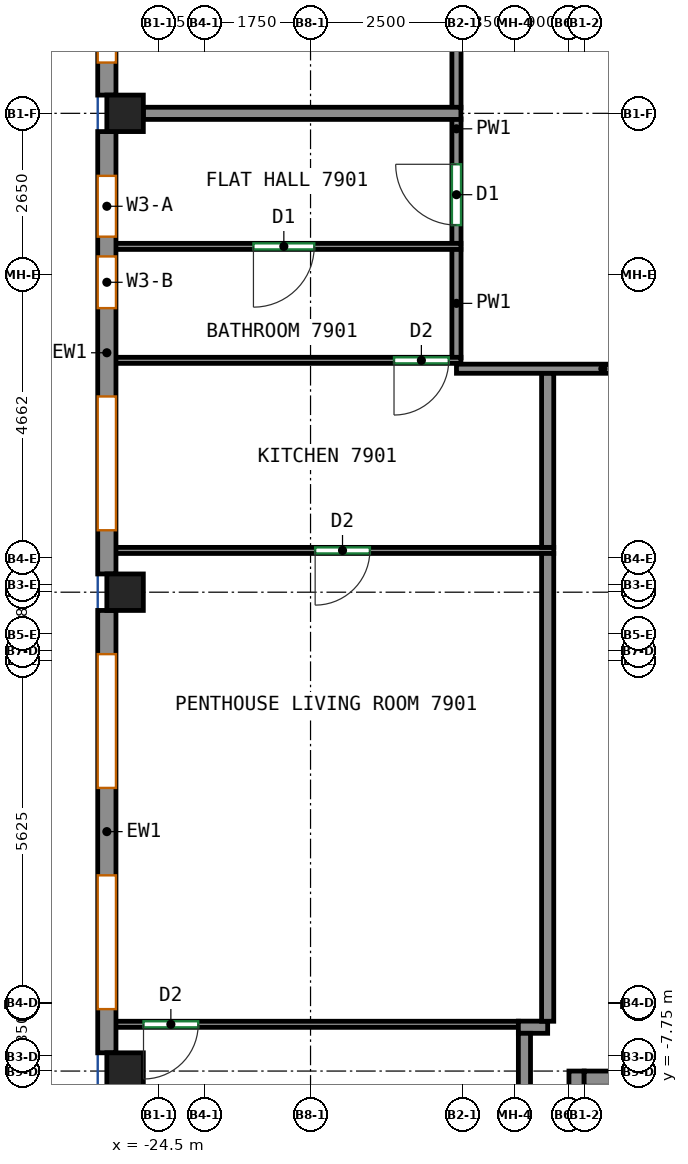
"""IFC4 building model, lengths in metres.
Left out: names, types, materials, properties, quantities, classifications, styles, units other than length and angle.
Written with IfcOpenShell. Run it as: python <this file> out.ifc"""

import sys

from ifc_helpers import new_model, si_unit, direction, frame, frame_2d, origin, origin_2d, place, context, subcontext, project, spatial, rectangle, extrude, source, transform, mapped, element, fill, save


model = new_model("IFC4")
c1 = context("Model", 3, precision=1e-05, world=origin(), true_north=direction((0.0, 1.0)))
c2 = subcontext(c1, "Body", "Model", "MODEL_VIEW")
j1 = project(units=[si_unit("LENGTHUNIT", "METRE"), si_unit("PLANEANGLEUNIT", "RADIAN")], contexts=[c1])
p1 = place(None, origin())
s1 = spatial("IfcSite", under=j1, at=p1, CompositionType="ELEMENT")
p2 = place(p1, origin())
s2 = spatial("IfcBuilding", under=s1, at=p2, CompositionType="ELEMENT")
p3 = place(p2, frame((0.0, 0.0, 315.4)))
s3 = spatial("IfcBuildingStorey", under=s2, at=p3, CompositionType="ELEMENT", Elevation=315.4)
m1 = source(origin(), c2, "Body", "SweptSolid", [
    extrude(rectangle(XDim=0.6, YDim=0.6, at=origin_2d()), origin(), (0.0, 0.0, 1.0), 3.0),
])
for number, where, z_axis, x_axis in (
    (1, (-25.05, -7.75, 0.0), (0.0, 0.0, 1.0), (1.0, 0.0, 0.0)),
    (2, (-25.05, 0.125, 0.0), (0.0, 0.0, 1.0), (1.0, 0.0, 0.0)),
    (3, (-25.05, 8.0, 0.0), (0.0, 0.0, 1.0), (1.0, 0.0, 0.0)),
):
    element("IfcColumn", number, at=place(p3, frame(where, z_axis=z_axis, x_axis=x_axis)), inside=s3, PredefinedType="COLUMN", context=c2, shape_type="MappedRepresentation", body=[
        mapped(m1, transform((0.0, 0.0, 0.0))),
    ])
m2 = source(origin(), c2, "Body", "SweptSolid", [
    extrude(rectangle(XDim=8.0, YDim=0.25, at=frame_2d((4.0, 0.0))), origin(), (0.0, 0.0, 1.0), 3.0),
])
p4 = place(p3, frame((-17.625, -15.75, 0.0), z_axis=(0.0, 0.0, 1.0), x_axis=(0.0, 1.0, 0.0)))
e4 = element("IfcWall", 4, at=p4, inside=s3, PredefinedType="SHEAR", context=c2, shape_type="MappedRepresentation", body=[
    mapped(m2, transform((0.0, 0.0, 0.0))),
])
m3 = source(origin(), c2, "Body", "SweptSolid", [
    extrude(rectangle(XDim=3.7, YDim=0.25, at=frame_2d((1.85, 0.0))), origin(), (0.0, 0.0, 1.0), 3.0),
])
p5 = place(p3, frame((-17.5, -7.875, 0.0), z_axis=(0.0, 0.0, 1.0), x_axis=(1.0, 0.0, 0.0)))
e5 = element("IfcWall", 5, at=p5, inside=s3, PredefinedType="SHEAR", context=c2, shape_type="MappedRepresentation", body=[
    mapped(m3, transform((0.0, 0.0, 0.0))),
])
m4 = source(origin(), c2, "Body", "SweptSolid", [
    extrude(rectangle(XDim=13.082, YDim=0.3, at=frame_2d((6.541, 0.0))), origin(), (0.0, 0.0, 1.0), 3.0),
])
p6 = place(p3, frame((-25.35, 21.382, 0.0), z_axis=(0.0, 0.0, 1.0), x_axis=(0.0, -1.0, 0.0)))
e6 = element("IfcWall", 6, at=p6, inside=s3, PredefinedType="SOLIDWALL", context=c2, shape_type="MappedRepresentation", body=[
    mapped(m4, transform((0.0, 0.0, 0.0))),
])
p7 = place(p6, frame((0.535, 0.0, 0.8)))
e7 = element("IfcOpeningElement", 7, at=p7, cuts=e6, PredefinedType="OPENING", context=c2, shape_type="SweptSolid", body=[
    extrude(rectangle(XDim=2.2, YDim=2.05, at=frame_2d((1.1, 1.025))), frame((0.0, 0.16, 0.0), z_axis=(0.0, -1.0, 0.0), x_axis=(1.0, 0.0, 0.0)), (0.0, 0.0, 1.0), 0.32),
])
p8 = place(p6, frame((3.806, 0.0, 0.8)))
e8 = element("IfcOpeningElement", 8, at=p8, cuts=e6, PredefinedType="OPENING", context=c2, shape_type="SweptSolid", body=[
    extrude(rectangle(XDim=2.2, YDim=2.05, at=frame_2d((1.1, 1.025))), frame((0.0, 0.16, 0.0), z_axis=(0.0, -1.0, 0.0), x_axis=(1.0, 0.0, 0.0)), (0.0, 0.0, 1.0), 0.32),
])
p9 = place(p6, frame((7.076, 0.0, 0.8)))
e9 = element("IfcOpeningElement", 9, at=p9, cuts=e6, PredefinedType="OPENING", context=c2, shape_type="SweptSolid", body=[
    extrude(rectangle(XDim=2.2, YDim=2.05, at=frame_2d((1.1, 1.025))), frame((0.0, 0.16, 0.0), z_axis=(0.0, -1.0, 0.0), x_axis=(1.0, 0.0, 0.0)), (0.0, 0.0, 1.0), 0.32),
])
p10 = place(p6, frame((10.347, 0.0, 0.8)))
e10 = element("IfcOpeningElement", 10, at=p10, cuts=e6, PredefinedType="OPENING", context=c2, shape_type="SweptSolid", body=[
    extrude(rectangle(XDim=2.2, YDim=2.05, at=frame_2d((1.1, 1.025))), frame((0.0, 0.16, 0.0), z_axis=(0.0, -1.0, 0.0), x_axis=(1.0, 0.0, 0.0)), (0.0, 0.0, 1.0), 0.32),
])
m5 = source(origin(), c2, "Body", "SweptSolid", [
    extrude(rectangle(XDim=7.275, YDim=0.3, at=frame_2d((3.637, 0.0))), origin(), (0.0, 0.0, 1.0), 3.0),
])
p11 = place(p3, frame((-25.35, 7.7, 0.0), z_axis=(0.0, 0.0, 1.0), x_axis=(0.0, -1.0, 0.0)))
e11 = element("IfcWall", 11, at=p11, inside=s3, PredefinedType="SOLIDWALL", context=c2, shape_type="MappedRepresentation", body=[
    mapped(m5, transform((0.0, 0.0, 0.0))),
])
p12 = place(p11, frame((0.728, 0.0, 0.8)))
e12 = element("IfcOpeningElement", 12, at=p12, cuts=e11, PredefinedType="OPENING", context=c2, shape_type="SweptSolid", body=[
    extrude(rectangle(XDim=1.0, YDim=2.05, at=frame_2d((0.5, 1.025))), frame((0.0, 0.16, 0.0), z_axis=(0.0, -1.0, 0.0), x_axis=(1.0, 0.0, 0.0)), (0.0, 0.0, 1.0), 0.32),
])
p13 = place(p11, frame((4.356, 0.0, 0.8)))
e13 = element("IfcOpeningElement", 13, at=p13, cuts=e11, PredefinedType="OPENING", context=c2, shape_type="SweptSolid", body=[
    extrude(rectangle(XDim=2.2, YDim=2.05, at=frame_2d((1.1, 1.025))), frame((0.0, 0.16, 0.0), z_axis=(0.0, -1.0, 0.0), x_axis=(1.0, 0.0, 0.0)), (0.0, 0.0, 1.0), 0.32),
])
p14 = place(p11, frame((2.053, 0.0, 0.8)))
e14 = element("IfcOpeningElement", 14, at=p14, cuts=e11, PredefinedType="OPENING", context=c2, shape_type="SweptSolid", body=[
    extrude(rectangle(XDim=0.85, YDim=2.05, at=frame_2d((0.425, 1.025))), frame((0.0, 0.16, 0.0), z_axis=(0.0, -1.0, 0.0), x_axis=(1.0, 0.0, 0.0)), (0.0, 0.0, 1.0), 0.32),
])
p15 = place(p3, frame((-25.35, -0.175, 0.0), z_axis=(0.0, 0.0, 1.0), x_axis=(0.0, -1.0, 0.0)))
e15 = element("IfcWall", 15, at=p15, inside=s3, PredefinedType="SOLIDWALL", context=c2, shape_type="MappedRepresentation", body=[
    mapped(m5, transform((0.0, 0.0, 0.0))),
])
p16 = place(p15, frame((0.719, 0.0, 0.8)))
e16 = element("IfcOpeningElement", 16, at=p16, cuts=e15, PredefinedType="OPENING", context=c2, shape_type="SweptSolid", body=[
    extrude(rectangle(XDim=2.2, YDim=2.05, at=frame_2d((1.1, 1.025))), frame((0.0, 0.16, 0.0), z_axis=(0.0, -1.0, 0.0), x_axis=(1.0, 0.0, 0.0)), (0.0, 0.0, 1.0), 0.32),
])
p17 = place(p15, frame((4.356, 0.0, 0.8)))
e17 = element("IfcOpeningElement", 17, at=p17, cuts=e15, PredefinedType="OPENING", context=c2, shape_type="SweptSolid", body=[
    extrude(rectangle(XDim=2.2, YDim=2.05, at=frame_2d((1.1, 1.025))), frame((0.0, 0.16, 0.0), z_axis=(0.0, -1.0, 0.0), x_axis=(1.0, 0.0, 0.0)), (0.0, 0.0, 1.0), 0.32),
])
p18 = place(p3, frame((-19.6, 3.8, 0.0), z_axis=(0.0, 0.0, 1.0), x_axis=(1.0, 0.0, 0.0)))
e18 = element("IfcWall", 18, at=p18, inside=s3, PredefinedType="PARTITIONING", context=c2, shape_type="SweptSolid", body=[
    extrude(rectangle(XDim=4.815, YDim=0.15, at=frame_2d((2.408, 0.0))), origin(), (0.0, 0.0, 1.0), 3.0),
])
p19 = place(p3, frame((-19.6, 3.978, 0.0), z_axis=(0.0, 0.0, 1.0), x_axis=(0.0, 1.0, 0.0)))
e19 = element("IfcWall", 19, at=p19, inside=s3, PredefinedType="PARTITIONING", context=c2, shape_type="SweptSolid", body=[
    extrude(rectangle(XDim=1.794, YDim=0.15, at=frame_2d((0.897, 0.0))), origin(), (0.0, 0.0, 1.0), 3.0),
])
p20 = place(p3, frame((-19.6, 5.852, 0.0), z_axis=(0.0, 0.0, 1.0), x_axis=(0.0, 1.0, 0.0)))
e20 = element("IfcWall", 20, at=p20, inside=s3, PredefinedType="PARTITIONING", context=c2, shape_type="SweptSolid", body=[
    extrude(rectangle(XDim=2.058, YDim=0.15, at=frame_2d((1.029, 0.0))), origin(), (0.0, 0.0, 1.0), 3.0),
])
p21 = place(p20, frame((0.31, 0.0, 0.0)))
e21 = element("IfcOpeningElement", 21, at=p21, cuts=e20, PredefinedType="OPENING", context=c2, shape_type="SweptSolid", body=[
    extrude(rectangle(XDim=1.0, YDim=2.1, at=frame_2d((0.5, 1.05))), frame((0.0, 0.085, 0.0), z_axis=(0.0, -1.0, 0.0), x_axis=(1.0, 0.0, 0.0)), (0.0, 0.0, 1.0), 0.17),
])
p22 = place(p3, frame((-19.6, 8.09, 0.0), z_axis=(0.0, 0.0, 1.0), x_axis=(0.0, 1.0, 0.0)))
e22 = element("IfcWall", 22, at=p22, inside=s3, PredefinedType="PARTITIONING", context=c2, shape_type="SweptSolid", body=[
    extrude(rectangle(XDim=15.635, YDim=0.15, at=frame_2d((7.817, 0.0))), origin(), (0.0, 0.0, 1.0), 3.0),
])
p23 = place(p3, frame((-18.582, -6.981, 0.0), z_axis=(0.0, 0.0, 1.0), x_axis=(-1.0, 0.0, 0.0)))
e23 = element("IfcWall", 23, at=p23, inside=s3, PredefinedType="PARTITIONING", context=c2, shape_type="SweptSolid", body=[
    extrude(rectangle(XDim=6.668, YDim=0.1, at=frame_2d((3.334, 0.0))), origin(), (0.0, 0.0, 1.0), 3.0),
])
p24 = place(p23, frame((5.265, 0.0, 0.0)))
e24 = element("IfcOpeningElement", 24, at=p24, cuts=e23, PredefinedType="OPENING", context=c2, shape_type="SweptSolid", body=[
    extrude(rectangle(XDim=0.9, YDim=2.1, at=frame_2d((0.45, 1.05))), frame((0.0, 0.06, 0.0), z_axis=(0.0, -1.0, 0.0), x_axis=(1.0, 0.0, 0.0)), (0.0, 0.0, 1.0), 0.12),
])
p25 = place(p3, frame((-18.582, -7.029, 0.0), z_axis=(0.0, 0.0, 1.0), x_axis=(1.0, 0.0, 0.0)))
e25 = element("IfcWall", 25, at=p25, inside=s3, PredefinedType="PARTITIONING", context=c2, shape_type="SweptSolid", body=[
    extrude(rectangle(XDim=0.482, YDim=0.2, at=frame_2d((0.241, 0.0))), origin(), (0.0, 0.0, 1.0), 3.0),
])
p26 = place(p3, frame((-18.482, -9.902, 0.0), z_axis=(0.0, 0.0, 1.0), x_axis=(0.0, 1.0, 0.0)))
e26 = element("IfcWall", 26, at=p26, inside=s3, PredefinedType="PARTITIONING", context=c2, shape_type="SweptSolid", body=[
    extrude(rectangle(XDim=2.773, YDim=0.2, at=frame_2d((1.387, 0.0))), origin(), (0.0, 0.0, 1.0), 3.0),
])
p27 = place(p3, frame((-18.0, 0.812, 0.0), z_axis=(0.0, 0.0, 1.0), x_axis=(-1.0, 0.0, 0.0)))
e27 = element("IfcWall", 27, at=p27, inside=s3, PredefinedType="PARTITIONING", context=c2, shape_type="SweptSolid", body=[
    extrude(rectangle(XDim=7.25, YDim=0.1, at=frame_2d((3.625, 0.0))), origin(), (0.0, 0.0, 1.0), 3.0),
])
p28 = place(p27, frame((3.024, 0.0, 0.0)))
e28 = element("IfcOpeningElement", 28, at=p28, cuts=e27, PredefinedType="OPENING", context=c2, shape_type="SweptSolid", body=[
    extrude(rectangle(XDim=0.9, YDim=2.1, at=frame_2d((0.45, 1.05))), frame((0.0, 0.06, 0.0), z_axis=(0.0, -1.0, 0.0), x_axis=(1.0, 0.0, 0.0)), (0.0, 0.0, 1.0), 0.12),
])
p29 = place(p3, frame((-18.1, -6.931, 0.0), z_axis=(0.0, 0.0, 1.0), x_axis=(0.0, 1.0, 0.0)))
e29 = element("IfcWall", 29, at=p29, inside=s3, PredefinedType="PARTITIONING", context=c2, shape_type="SweptSolid", body=[
    extrude(rectangle(XDim=7.693, YDim=0.2, at=frame_2d((3.846, 0.0))), origin(), (0.0, 0.0, 1.0), 3.0),
])
p30 = place(p3, frame((-19.527, 3.938, 0.0), z_axis=(0.0, 0.0, 1.0), x_axis=(-1.0, 0.0, 0.0)))
e30 = element("IfcWall", 30, at=p30, inside=s3, PredefinedType="PARTITIONING", context=c2, shape_type="SweptSolid", body=[
    extrude(rectangle(XDim=5.723, YDim=0.1, at=frame_2d((2.861, 0.0))), origin(), (0.0, 0.0, 1.0), 3.0),
])
p31 = place(p30, frame((0.2, 0.0, 0.0)))
e31 = element("IfcOpeningElement", 31, at=p31, cuts=e30, PredefinedType="OPENING", context=c2, shape_type="SweptSolid", body=[
    extrude(rectangle(XDim=0.9, YDim=2.1, at=frame_2d((0.45, 1.05))), frame((0.0, 0.06, 0.0), z_axis=(0.0, -1.0, 0.0), x_axis=(1.0, 0.0, 0.0)), (0.0, 0.0, 1.0), 0.12),
])
p32 = place(p3, frame((-18.1, 0.862, 0.0), z_axis=(0.0, 0.0, 1.0), x_axis=(0.0, 1.0, 0.0)))
e32 = element("IfcWall", 32, at=p32, inside=s3, PredefinedType="PARTITIONING", context=c2, shape_type="SweptSolid", body=[
    extrude(rectangle(XDim=2.861, YDim=0.2, at=frame_2d((1.43, 0.0))), origin(), (0.0, 0.0, 1.0), 3.0),
])
p33 = place(p3, frame((-19.527, 5.812, 0.0), z_axis=(0.0, 0.0, 1.0), x_axis=(-1.0, 0.0, 0.0)))
e33 = element("IfcWall", 33, at=p33, inside=s3, PredefinedType="PARTITIONING", context=c2, shape_type="SweptSolid", body=[
    extrude(rectangle(XDim=5.723, YDim=0.1, at=frame_2d((2.861, 0.0))), origin(), (0.0, 0.0, 1.0), 3.0),
])
p34 = place(p33, frame((2.412, 0.0, 0.0)))
e34 = element("IfcOpeningElement", 34, at=p34, cuts=e33, PredefinedType="OPENING", context=c2, shape_type="SweptSolid", body=[
    extrude(rectangle(XDim=1.0, YDim=2.1, at=frame_2d((0.5, 1.05))), frame((0.0, 0.06, 0.0), z_axis=(0.0, -1.0, 0.0), x_axis=(1.0, 0.0, 0.0)), (0.0, 0.0, 1.0), 0.12),
])
p35 = place(p3, frame((-19.527, 8.0, 0.0), z_axis=(0.0, 0.0, 1.0), x_axis=(-1.0, 0.0, 0.0)))
e35 = element("IfcWall", 35, at=p35, inside=s3, PredefinedType="PARTITIONING", context=c2, shape_type="SweptSolid", body=[
    extrude(rectangle(XDim=5.223, YDim=0.2, at=frame_2d((2.611, 0.0))), origin(), (0.0, 0.0, 1.0), 3.0),
])
p36 = place(p10, origin())
e36 = element("IfcWindow", 36, at=p36, inside=s3, PartitioningType="SINGLE_PANEL", PredefinedType="WINDOW", context=c2, shape_type="SweptSolid", body=[
    extrude(rectangle(XDim=2.2, YDim=2.05, at=frame_2d((1.1, 1.025))), frame((0.0, 0.03, 0.0), z_axis=(0.0, -1.0, 0.0), x_axis=(1.0, 0.0, 0.0)), (0.0, 0.0, 1.0), 0.06),
])
fill(e10, e36)
p37 = place(p12, origin())
e37 = element("IfcWindow", 37, at=p37, inside=s3, PartitioningType="SINGLE_PANEL", PredefinedType="WINDOW", context=c2, shape_type="SweptSolid", body=[
    extrude(rectangle(XDim=1.0, YDim=2.05, at=frame_2d((0.5, 1.025))), frame((0.0, 0.03, 0.0), z_axis=(0.0, -1.0, 0.0), x_axis=(1.0, 0.0, 0.0)), (0.0, 0.0, 1.0), 0.06),
])
fill(e12, e37)
p38 = place(p13, origin())
e38 = element("IfcWindow", 38, at=p38, inside=s3, PartitioningType="SINGLE_PANEL", PredefinedType="WINDOW", context=c2, shape_type="SweptSolid", body=[
    extrude(rectangle(XDim=2.2, YDim=2.05, at=frame_2d((1.1, 1.025))), frame((0.0, 0.03, 0.0), z_axis=(0.0, -1.0, 0.0), x_axis=(1.0, 0.0, 0.0)), (0.0, 0.0, 1.0), 0.06),
])
fill(e13, e38)
p39 = place(p16, origin())
e39 = element("IfcWindow", 39, at=p39, inside=s3, PartitioningType="SINGLE_PANEL", PredefinedType="WINDOW", context=c2, shape_type="SweptSolid", body=[
    extrude(rectangle(XDim=2.2, YDim=2.05, at=frame_2d((1.1, 1.025))), frame((0.0, 0.03, 0.0), z_axis=(0.0, -1.0, 0.0), x_axis=(1.0, 0.0, 0.0)), (0.0, 0.0, 1.0), 0.06),
])
fill(e16, e39)
p40 = place(p17, origin())
e40 = element("IfcWindow", 40, at=p40, inside=s3, PartitioningType="SINGLE_PANEL", PredefinedType="WINDOW", context=c2, shape_type="SweptSolid", body=[
    extrude(rectangle(XDim=2.2, YDim=2.05, at=frame_2d((1.1, 1.025))), frame((0.0, 0.03, 0.0), z_axis=(0.0, -1.0, 0.0), x_axis=(1.0, 0.0, 0.0)), (0.0, 0.0, 1.0), 0.06),
])
fill(e17, e40)
p41 = place(p24, origin())
e41 = element("IfcDoor", 41, at=p41, inside=s3, OperationType="SINGLE_SWING_RIGHT", PredefinedType="DOOR", context=c2, shape_type="SweptSolid", body=[
    extrude(rectangle(XDim=0.9, YDim=2.1, at=frame_2d((0.45, 1.05))), frame((0.0, 0.025, 0.0), z_axis=(0.0, -1.0, 0.0), x_axis=(1.0, 0.0, 0.0)), (0.0, 0.0, 1.0), 0.05),
])
fill(e24, e41)
p42 = place(p28, origin())
e42 = element("IfcDoor", 42, at=p42, inside=s3, OperationType="SINGLE_SWING_RIGHT", PredefinedType="DOOR", context=c2, shape_type="SweptSolid", body=[
    extrude(rectangle(XDim=0.9, YDim=2.1, at=frame_2d((0.45, 1.05))), frame((0.0, 0.025, 0.0), z_axis=(0.0, -1.0, 0.0), x_axis=(1.0, 0.0, 0.0)), (0.0, 0.0, 1.0), 0.05),
])
fill(e28, e42)
p43 = place(p31, origin())
e43 = element("IfcDoor", 43, at=p43, inside=s3, OperationType="SINGLE_SWING_RIGHT", PredefinedType="DOOR", context=c2, shape_type="SweptSolid", body=[
    extrude(rectangle(XDim=0.9, YDim=2.1, at=frame_2d((0.45, 1.05))), frame((0.0, 0.025, 0.0), z_axis=(0.0, -1.0, 0.0), x_axis=(1.0, 0.0, 0.0)), (0.0, 0.0, 1.0), 0.05),
])
fill(e31, e43)
p44 = place(p34, origin())
e44 = element("IfcDoor", 44, at=p44, inside=s3, OperationType="SINGLE_SWING_RIGHT", PredefinedType="DOOR", context=c2, shape_type="SweptSolid", body=[
    extrude(rectangle(XDim=1.0, YDim=2.1, at=frame_2d((0.5, 1.05))), frame((0.0, 0.025, 0.0), z_axis=(0.0, -1.0, 0.0), x_axis=(1.0, 0.0, 0.0)), (0.0, 0.0, 1.0), 0.05),
])
fill(e34, e44)
p45 = place(p21, origin())
e45 = element("IfcDoor", 45, at=p45, inside=s3, OperationType="SINGLE_SWING_RIGHT", PredefinedType="DOOR", context=c2, shape_type="SweptSolid", body=[
    extrude(rectangle(XDim=1.0, YDim=2.1, at=frame_2d((0.5, 1.05))), frame((0.0, 0.025, 0.0), z_axis=(0.0, -1.0, 0.0), x_axis=(1.0, 0.0, 0.0)), (0.0, 0.0, 1.0), 0.05),
])
fill(e21, e45)
p46 = place(p14, origin())
e46 = element("IfcWindow", 46, at=p46, inside=s3, PartitioningType="SINGLE_PANEL", PredefinedType="WINDOW", context=c2, shape_type="SweptSolid", body=[
    extrude(rectangle(XDim=0.85, YDim=2.05, at=frame_2d((0.425, 1.025))), frame((0.0, 0.03, 0.0), z_axis=(0.0, -1.0, 0.0), x_axis=(1.0, 0.0, 0.0)), (0.0, 0.0, 1.0), 0.06),
])
fill(e14, e46)
save(model, sys.argv[1])
